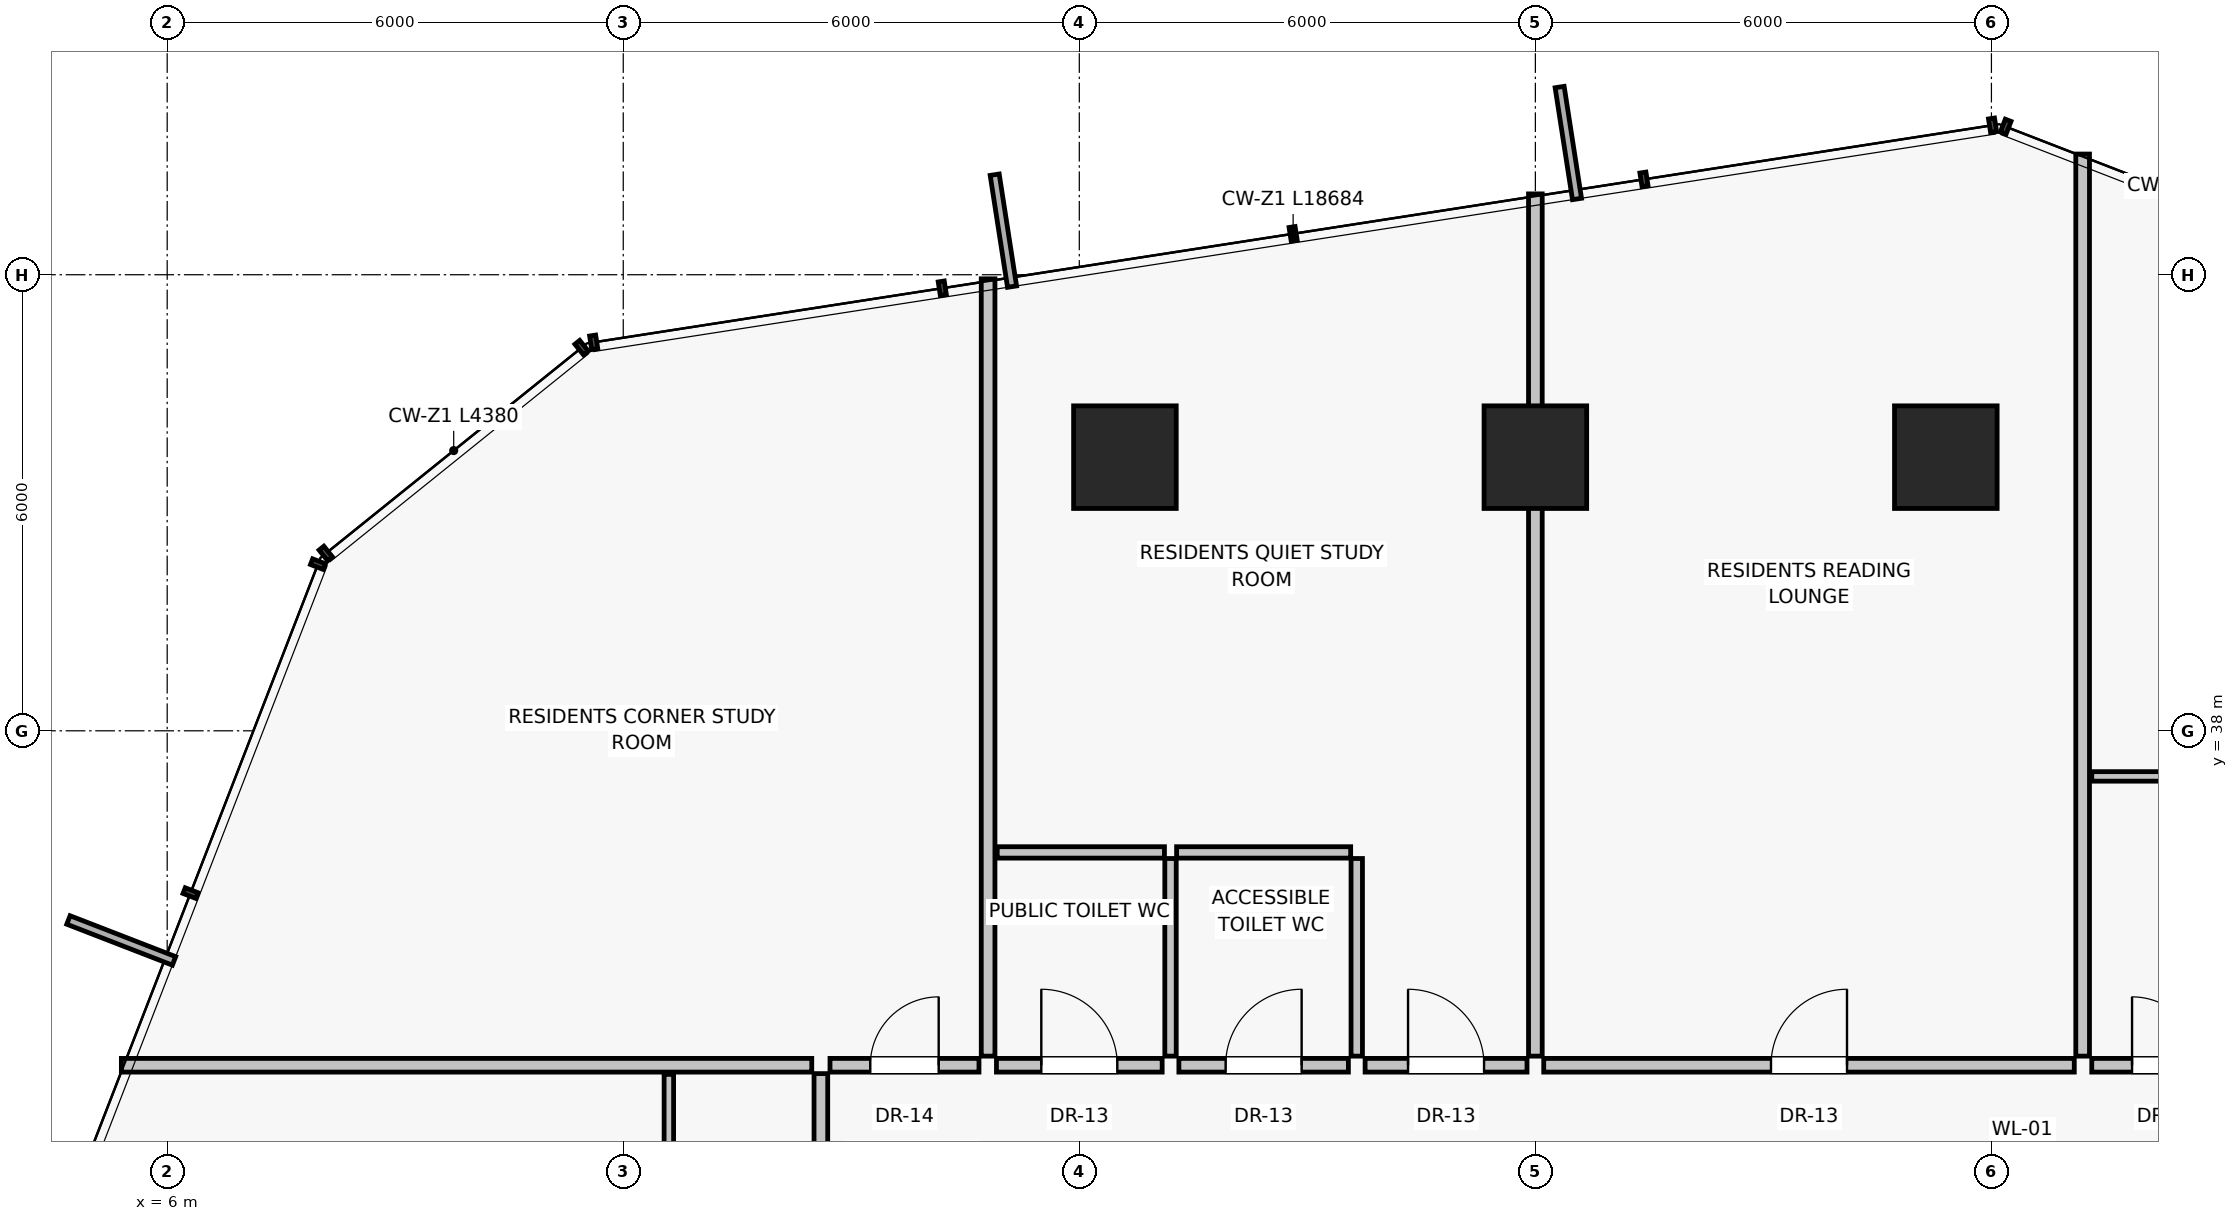
"""IFC4 building model, lengths in metres.
Left out: names, types, materials, properties, quantities, classifications, styles, units other than length and angle.
Written with IfcOpenShell. Run it as: python <this file> out.ifc"""

import sys

from ifc_helpers import new_model, si_unit, direction, frame, frame_2d, origin, origin_2d, place, context, subcontext, project, spatial, rectangle, extrude, source, transform, mapped, element, fill, save


model = new_model("IFC4")
c1 = context("Model", 3, precision=1e-05, world=origin(), true_north=direction((0.0, 1.0)))
c2 = subcontext(c1, "Body", "Model", "MODEL_VIEW")
j1 = project(units=[si_unit("LENGTHUNIT", "METRE"), si_unit("PLANEANGLEUNIT", "RADIAN")], contexts=[c1])
p1 = place(None, origin())
s1 = spatial("IfcSite", under=j1, at=p1, CompositionType="ELEMENT")
p2 = place(p1, origin())
s2 = spatial("IfcBuilding", under=s1, at=p2, CompositionType="ELEMENT")
p3 = place(p2, frame((0.0, 0.0, 53.3)))
s3 = spatial("IfcBuildingStorey", under=s2, at=p3, CompositionType="ELEMENT", Elevation=53.3)
for number, where, z_axis, x_axis in (
    (1, (29.4, 41.6, 0.0), (0.0, 0.0, 1.0), (1.0, 0.0, 0.0)),
    (2, (24.0, 41.6, 0.0), (0.0, 0.0, 1.0), (1.0, 0.0, 0.0)),
    (3, (18.6, 41.6, 0.0), (0.0, 0.0, 1.0), (1.0, 0.0, 0.0)),
):
    element("IfcColumn", number, at=place(p3, frame(where, z_axis=z_axis, x_axis=x_axis)), inside=s3, PredefinedType="COLUMN", context=c2, shape_type="SweptSolid", body=[
        extrude(rectangle(XDim=1.35, YDim=1.35, at=origin_2d()), origin(), (0.0, 0.0, 1.0), 3.25),
    ])
p4 = place(p3, frame((16.8, 33.72, 0.0), z_axis=(0.0, 0.0, 1.0), x_axis=(0.0, 1.0, 0.0)))
e4 = element("IfcWall", 4, at=p4, inside=s3, PredefinedType="PARTITIONING", context=c2, shape_type="SweptSolid", body=[
    extrude(rectangle(XDim=10.227, YDim=0.18, at=frame_2d((5.113, 0.0))), origin(), (0.0, 0.0, 1.0), 2.97),
])
p5 = place(p3, frame((31.2, 33.72, 0.0), z_axis=(0.0, 0.0, 1.0), x_axis=(0.0, 1.0, 0.0)))
e5 = element("IfcWall", 5, at=p5, inside=s3, PredefinedType="PARTITIONING", context=c2, shape_type="SweptSolid", body=[
    extrude(rectangle(XDim=11.868, YDim=0.18, at=frame_2d((5.934, 0.0))), origin(), (0.0, 0.0, 1.0), 2.97),
])
p6 = place(p3, frame((16.91, 33.6, 0.0), z_axis=(0.0, 0.0, 1.0), x_axis=(1.0, 0.0, 0.0)))
e6 = element("IfcWall", 6, at=p6, inside=s3, PredefinedType="PARTITIONING", context=c2, shape_type="SweptSolid", body=[
    extrude(rectangle(XDim=2.18, YDim=0.18, at=frame_2d((1.09, 0.0))), origin(), (0.0, 0.0, 1.0), 2.97),
])
p7 = place(p6, frame((0.59, 0.0, 0.0)))
e7 = element("IfcOpeningElement", 7, at=p7, cuts=e6, PredefinedType="OPENING", context=c2, shape_type="SweptSolid", body=[
    extrude(rectangle(XDim=1.0, YDim=2.01, at=frame_2d((0.5, 1.005))), frame((0.0, 0.1, 0.0), z_axis=(0.0, -1.0, 0.0), x_axis=(1.0, 0.0, 0.0)), (0.0, 0.0, 1.0), 0.2),
])
p8 = place(p3, frame((19.31, 33.6, 0.0), z_axis=(0.0, 0.0, 1.0), x_axis=(1.0, 0.0, 0.0)))
e8 = element("IfcWall", 8, at=p8, inside=s3, PredefinedType="PARTITIONING", context=c2, shape_type="SweptSolid", body=[
    extrude(rectangle(XDim=2.23, YDim=0.18, at=frame_2d((1.115, 0.0))), origin(), (0.0, 0.0, 1.0), 2.97),
])
p9 = place(p8, frame((0.615, 0.0, 0.0)))
e9 = element("IfcOpeningElement", 9, at=p9, cuts=e8, PredefinedType="OPENING", context=c2, shape_type="SweptSolid", body=[
    extrude(rectangle(XDim=1.0, YDim=2.01, at=frame_2d((0.5, 1.005))), frame((0.0, 0.1, 0.0), z_axis=(0.0, -1.0, 0.0), x_axis=(1.0, 0.0, 0.0)), (0.0, 0.0, 1.0), 0.2),
])
p10 = place(p3, frame((21.76, 33.6, 0.0), z_axis=(0.0, 0.0, 1.0), x_axis=(1.0, 0.0, 0.0)))
e10 = element("IfcWall", 10, at=p10, inside=s3, PredefinedType="PARTITIONING", context=c2, shape_type="SweptSolid", body=[
    extrude(rectangle(XDim=2.13, YDim=0.18, at=frame_2d((1.065, 0.0))), origin(), (0.0, 0.0, 1.0), 2.97),
])
p11 = place(p10, frame((0.565, 0.0, 0.0)))
e11 = element("IfcOpeningElement", 11, at=p11, cuts=e10, PredefinedType="OPENING", context=c2, shape_type="SweptSolid", body=[
    extrude(rectangle(XDim=1.0, YDim=2.01, at=frame_2d((0.5, 1.005))), frame((0.0, 0.1, 0.0), z_axis=(0.0, -1.0, 0.0), x_axis=(1.0, 0.0, 0.0)), (0.0, 0.0, 1.0), 0.2),
])
p12 = place(p3, frame((24.11, 33.6, 0.0), z_axis=(0.0, 0.0, 1.0), x_axis=(1.0, 0.0, 0.0)))
e12 = element("IfcWall", 12, at=p12, inside=s3, PredefinedType="PARTITIONING", context=c2, shape_type="SweptSolid", body=[
    extrude(rectangle(XDim=6.98, YDim=0.18, at=frame_2d((3.49, 0.0))), origin(), (0.0, 0.0, 1.0), 2.97),
])
p13 = place(p12, frame((2.99, 0.0, 0.0)))
e13 = element("IfcOpeningElement", 13, at=p13, cuts=e12, PredefinedType="OPENING", context=c2, shape_type="SweptSolid", body=[
    extrude(rectangle(XDim=1.0, YDim=2.01, at=frame_2d((0.5, 1.005))), frame((0.0, 0.1, 0.0), z_axis=(0.0, -1.0, 0.0), x_axis=(1.0, 0.0, 0.0)), (0.0, 0.0, 1.0), 0.2),
])
for number, where, z_axis, x_axis in (
    (14, (19.2, 33.72, 0.0), (0.0, 0.0, 1.0), (0.0, 1.0, 0.0)),
    (15, (21.65, 33.72, 0.0), (0.0, 0.0, 1.0), (0.0, 1.0, 0.0)),
):
    element("IfcWall", number, at=place(p3, frame(where, z_axis=z_axis, x_axis=x_axis)), inside=s3, PredefinedType="PARTITIONING", context=c2, shape_type="SweptSolid", body=[
        extrude(rectangle(XDim=2.6, YDim=0.15, at=frame_2d((1.3, 0.0))), origin(), (0.0, 0.0, 1.0), 2.97),
    ])
p14 = place(p3, frame((16.92, 36.4, 0.0), z_axis=(0.0, 0.0, 1.0), x_axis=(1.0, 0.0, 0.0)))
e16 = element("IfcWall", 16, at=p14, inside=s3, PredefinedType="PARTITIONING", context=c2, shape_type="SweptSolid", body=[
    extrude(rectangle(XDim=2.2, YDim=0.15, at=frame_2d((1.1, 0.0))), origin(), (0.0, 0.0, 1.0), 2.55),
])
p15 = place(p3, frame((19.28, 36.4, 0.0), z_axis=(0.0, 0.0, 1.0), x_axis=(1.0, 0.0, 0.0)))
e17 = element("IfcWall", 17, at=p15, inside=s3, PredefinedType="PARTITIONING", context=c2, shape_type="SweptSolid", body=[
    extrude(rectangle(XDim=2.29, YDim=0.15, at=frame_2d((1.145, 0.0))), origin(), (0.0, 0.0, 1.0), 2.55),
])
p16 = place(p3, frame((24.0, 33.72, 0.0), z_axis=(0.0, 0.0, 1.0), x_axis=(0.0, 1.0, 0.0)))
e18 = element("IfcWall", 18, at=p16, inside=s3, PredefinedType="PARTITIONING", context=c2, shape_type="SweptSolid", body=[
    extrude(rectangle(XDim=11.344, YDim=0.18, at=frame_2d((5.672, 0.0))), origin(), (0.0, 0.0, 1.0), 2.97),
])
p17 = place(p3, frame((14.48, 33.6, 0.0), z_axis=(0.0, 0.0, 1.0), x_axis=(-1.0, 0.0, 0.0)))
e19 = element("IfcWall", 19, at=p17, inside=s3, PredefinedType="PARTITIONING", context=c2, shape_type="SweptSolid", body=[
    extrude(rectangle(XDim=9.083, YDim=0.18, at=frame_2d((4.542, 0.0))), origin(), (0.0, 0.0, 1.0), 2.97),
])
p18 = place(p3, frame((14.6, 24.618, 0.0), z_axis=(0.0, 0.0, 1.0), x_axis=(0.0, 1.0, 0.0)))
e20 = element("IfcWall", 20, at=p18, inside=s3, PredefinedType="PARTITIONING", context=c2, shape_type="SweptSolid", body=[
    extrude(rectangle(XDim=8.872, YDim=0.18, at=frame_2d((4.436, 0.0))), origin(), (0.0, 0.0, 1.0), 2.97),
])
p19 = place(p18, frame((2.995, 0.0, 0.0)))
e21 = element("IfcOpeningElement", 21, at=p19, cuts=e20, PredefinedType="OPENING", context=c2, shape_type="SweptSolid", body=[
    extrude(rectangle(XDim=0.95, YDim=2.02, at=frame_2d((0.475, 1.01))), frame((0.0, 0.1, 0.0), z_axis=(0.0, -1.0, 0.0), x_axis=(1.0, 0.0, 0.0)), (0.0, 0.0, 1.0), 0.2),
])
p20 = place(p3, frame((12.6, 29.518, 0.0), z_axis=(0.0, 0.0, 1.0), x_axis=(0.0, 1.0, 0.0)))
e22 = element("IfcWall", 22, at=p20, inside=s3, PredefinedType="PARTITIONING", context=c2, shape_type="SweptSolid", body=[
    extrude(rectangle(XDim=3.962, YDim=0.125, at=frame_2d((1.981, 0.0))), origin(), (0.0, 0.0, 1.0), 2.97),
])
p21 = place(p3, frame((14.72, 33.6, 0.0), z_axis=(0.0, 0.0, 1.0), x_axis=(1.0, 0.0, 0.0)))
e23 = element("IfcWall", 23, at=p21, inside=s3, PredefinedType="PARTITIONING", context=c2, shape_type="SweptSolid", body=[
    extrude(rectangle(XDim=1.96, YDim=0.18, at=frame_2d((0.98, 0.0))), origin(), (0.0, 0.0, 1.0), 2.97),
])
p22 = place(p21, frame((0.53, 0.0, 0.0)))
e24 = element("IfcOpeningElement", 24, at=p22, cuts=e23, PredefinedType="OPENING", context=c2, shape_type="SweptSolid", body=[
    extrude(rectangle(XDim=0.9, YDim=2.01, at=frame_2d((0.45, 1.005))), frame((0.0, 0.1, 0.0), z_axis=(0.0, -1.0, 0.0), x_axis=(1.0, 0.0, 0.0)), (0.0, 0.0, 1.0), 0.2),
])
p23 = place(p3, frame((31.32, 33.6, 0.0), z_axis=(0.0, 0.0, 1.0), x_axis=(1.0, 0.0, 0.0)))
e25 = element("IfcWall", 25, at=p23, inside=s3, PredefinedType="PARTITIONING", context=c2, shape_type="SweptSolid", body=[
    extrude(rectangle(XDim=1.96, YDim=0.18, at=frame_2d((0.98, 0.0))), origin(), (0.0, 0.0, 1.0), 2.97),
])
p24 = place(p23, frame((0.53, 0.0, 0.0)))
e26 = element("IfcOpeningElement", 26, at=p24, cuts=e25, PredefinedType="OPENING", context=c2, shape_type="SweptSolid", body=[
    extrude(rectangle(XDim=0.9, YDim=2.01, at=frame_2d((0.45, 1.005))), frame((0.0, 0.1, 0.0), z_axis=(0.0, -1.0, 0.0), x_axis=(1.0, 0.0, 0.0)), (0.0, 0.0, 1.0), 0.2),
])
p25 = place(p3, frame((31.32, 37.4, 0.0), z_axis=(0.0, 0.0, 1.0), x_axis=(1.0, 0.0, 0.0)))
e27 = element("IfcWall", 27, at=p25, inside=s3, PredefinedType="PARTITIONING", context=c2, shape_type="SweptSolid", body=[
    extrude(rectangle(XDim=8.614, YDim=0.125, at=frame_2d((4.307, 0.0))), origin(), (0.0, 0.0, 1.0), 2.97),
])
p26 = place(p25, frame((3.877, 0.0, 0.0)))
e28 = element("IfcOpeningElement", 28, at=p26, cuts=e27, PredefinedType="OPENING", context=c2, shape_type="SweptSolid", body=[
    extrude(rectangle(XDim=0.86, YDim=2.01, at=frame_2d((0.43, 1.005))), frame((0.0, 0.073, 0.0), z_axis=(0.0, -1.0, 0.0), x_axis=(1.0, 0.0, 0.0)), (0.0, 0.0, 1.0), 0.145),
])
m1 = source(origin(), c2, "Body", "SweptSolid", [
    extrude(rectangle(XDim=1.0, YDim=2.01, at=frame_2d((0.5, 1.005))), frame((0.0, 0.025, 0.0), z_axis=(0.0, -1.0, 0.0), x_axis=(1.0, 0.0, 0.0)), (0.0, 0.0, 1.0), 0.05),
])
p27 = place(p7, origin())
e29 = element("IfcDoor", 29, at=p27, inside=s3, OperationType="SINGLE_SWING_LEFT", PredefinedType="DOOR", context=c2, shape_type="MappedRepresentation", body=[
    mapped(m1, transform((0.0, 0.0, 0.0), scale=1.0)),
])
fill(e7, e29)
p28 = place(p9, origin())
e30 = element("IfcDoor", 30, at=p28, inside=s3, OperationType="SINGLE_SWING_RIGHT", PredefinedType="DOOR", context=c2, shape_type="MappedRepresentation", body=[
    mapped(m1, transform((0.0, 0.0, 0.0), scale=1.0)),
])
fill(e9, e30)
p29 = place(p11, origin())
e31 = element("IfcDoor", 31, at=p29, inside=s3, OperationType="SINGLE_SWING_LEFT", PredefinedType="DOOR", context=c2, shape_type="MappedRepresentation", body=[
    mapped(m1, transform((0.0, 0.0, 0.0), scale=1.0)),
])
fill(e11, e31)
p30 = place(p13, origin())
e32 = element("IfcDoor", 32, at=p30, inside=s3, OperationType="SINGLE_SWING_RIGHT", PredefinedType="DOOR", context=c2, shape_type="MappedRepresentation", body=[
    mapped(m1, transform((0.0, 0.0, 0.0), scale=1.0)),
])
fill(e13, e32)
m2 = source(origin(), c2, "Body", "SweptSolid", [
    extrude(rectangle(XDim=0.9, YDim=2.01, at=frame_2d((0.45, 1.005))), frame((0.0, 0.025, 0.0), z_axis=(0.0, -1.0, 0.0), x_axis=(1.0, 0.0, 0.0)), (0.0, 0.0, 1.0), 0.05),
])
p31 = place(p22, origin())
e33 = element("IfcDoor", 33, at=p31, inside=s3, OperationType="SINGLE_SWING_RIGHT", PredefinedType="DOOR", context=c2, shape_type="MappedRepresentation", body=[
    mapped(m2, transform((0.0, 0.0, 0.0), scale=1.0)),
])
fill(e24, e33)
p32 = place(p24, origin())
e34 = element("IfcDoor", 34, at=p32, inside=s3, OperationType="SINGLE_SWING_LEFT", PredefinedType="DOOR", context=c2, shape_type="MappedRepresentation", body=[
    mapped(m2, transform((0.0, 0.0, 0.0), scale=1.0)),
])
fill(e26, e34)
save(model, sys.argv[1])
